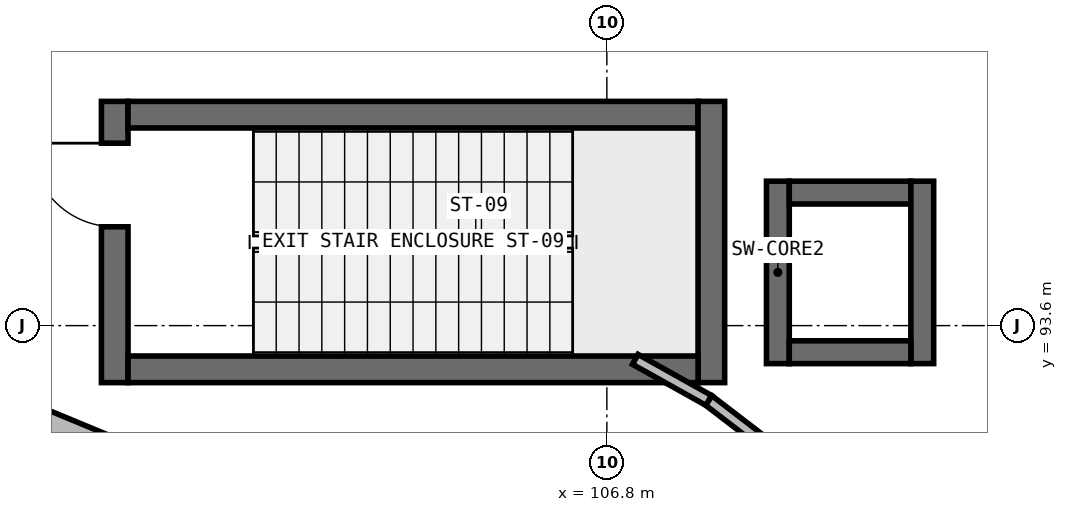
"""IFC4 building model, lengths in metres.
Left out: names, types, materials, properties, quantities, classifications, styles, units other than length and angle.
Written with IfcOpenShell. Run it as: python <this file> out.ifc"""

import sys

from ifc_helpers import new_model, si_unit, direction, frame, frame_2d, origin, place, context, subcontext, project, spatial, rectangle, extrude, element, fill, save


model = new_model("IFC4")
c1 = context("Model", 3, precision=1e-05, world=origin(), true_north=direction((0.0, 1.0)))
c2 = subcontext(c1, "Body", "Model", "MODEL_VIEW")
j1 = project(units=[si_unit("LENGTHUNIT", "METRE"), si_unit("PLANEANGLEUNIT", "RADIAN")], contexts=[c1])
p1 = place(None, origin())
s1 = spatial("IfcSite", under=j1, at=p1, CompositionType="ELEMENT")
p2 = place(p1, origin())
s2 = spatial("IfcBuilding", under=s1, at=p2, CompositionType="ELEMENT")
p3 = place(p2, origin())
s3 = spatial("IfcBuildingStorey", under=s2, at=p3, CompositionType="ELEMENT", Elevation=0.0)
p4 = place(p3, frame((100.325, 92.85, 0.0), z_axis=(0.0, 0.0, 1.0), x_axis=(0.0, 1.0, 0.0)))
e1 = element("IfcWall", 1, at=p4, inside=s3, PredefinedType="SHEAR", context=c2, shape_type="SweptSolid", body=[
    extrude(rectangle(XDim=3.7, YDim=0.35, at=frame_2d((1.85, 0.0))), origin(), (0.0, 0.0, 1.0), 5.25),
])
p5 = place(p4, frame((2.05, 0.0, 0.0)))
e2 = element("IfcOpeningElement", 2, at=p5, cuts=e1, PredefinedType="OPENING", context=c2, shape_type="SweptSolid", body=[
    extrude(rectangle(XDim=1.1, YDim=2.15, at=frame_2d((0.55, 1.075))), frame((0.0, 0.185, 0.0), z_axis=(0.0, -1.0, 0.0), x_axis=(1.0, 0.0, 0.0)), (0.0, 0.0, 1.0), 0.37),
])
p6 = place(p3, frame((100.5, 96.375, 0.0), z_axis=(0.0, 0.0, 1.0), x_axis=(1.0, 0.0, 0.0)))
e3 = element("IfcWall", 3, at=p6, inside=s3, PredefinedType="SHEAR", context=c2, shape_type="SweptSolid", body=[
    extrude(rectangle(XDim=7.5, YDim=0.35, at=frame_2d((3.75, 0.0))), origin(), (0.0, 0.0, 1.0), 5.25),
])
p7 = place(p3, frame((108.175, 96.55, 0.0), z_axis=(0.0, 0.0, 1.0), x_axis=(0.0, -1.0, 0.0)))
e4 = element("IfcWall", 4, at=p7, inside=s3, PredefinedType="SHEAR", context=c2, shape_type="SweptSolid", body=[
    extrude(rectangle(XDim=3.7, YDim=0.35, at=frame_2d((1.85, 0.0))), origin(), (0.0, 0.0, 1.0), 5.25),
])
p8 = place(p3, frame((108.0, 93.025, 0.0), z_axis=(0.0, 0.0, 1.0), x_axis=(-1.0, 0.0, 0.0)))
e5 = element("IfcWall", 5, at=p8, inside=s3, PredefinedType="SHEAR", context=c2, shape_type="SweptSolid", body=[
    extrude(rectangle(XDim=7.5, YDim=0.35, at=frame_2d((3.75, 0.0))), origin(), (0.0, 0.0, 1.0), 5.25),
])
p9 = place(p3, frame((109.05, 93.1, 0.0), z_axis=(0.0, 0.0, 1.0), x_axis=(0.0, 1.0, 0.0)))
e6 = element("IfcWall", 6, at=p9, inside=s3, PredefinedType="SHEAR", context=c2, shape_type="SweptSolid", body=[
    extrude(rectangle(XDim=2.4, YDim=0.3, at=frame_2d((1.2, 0.0))), origin(), (0.0, 0.0, 1.0), 5.07),
])
p10 = place(p3, frame((109.2, 95.35, 0.0), z_axis=(0.0, 0.0, 1.0), x_axis=(1.0, 0.0, 0.0)))
e7 = element("IfcWall", 7, at=p10, inside=s3, PredefinedType="SHEAR", context=c2, shape_type="SweptSolid", body=[
    extrude(rectangle(XDim=1.6, YDim=0.3, at=frame_2d((0.8, 0.0))), origin(), (0.0, 0.0, 1.0), 5.07),
])
p11 = place(p3, frame((110.95, 95.5, 0.0), z_axis=(0.0, 0.0, 1.0), x_axis=(0.0, -1.0, 0.0)))
e8 = element("IfcWall", 8, at=p11, inside=s3, PredefinedType="SHEAR", context=c2, shape_type="SweptSolid", body=[
    extrude(rectangle(XDim=2.4, YDim=0.3, at=frame_2d((1.2, 0.0))), origin(), (0.0, 0.0, 1.0), 5.07),
])
p12 = place(p3, frame((110.8, 93.25, 0.0), z_axis=(0.0, 0.0, 1.0), x_axis=(-1.0, 0.0, 0.0)))
e9 = element("IfcWall", 9, at=p12, inside=s3, PredefinedType="SHEAR", context=c2, shape_type="SweptSolid", body=[
    extrude(rectangle(XDim=1.6, YDim=0.3, at=frame_2d((0.8, 0.0))), origin(), (0.0, 0.0, 1.0), 5.07),
])
p13 = place(p3, frame((111.675, 98.726, 0.0), z_axis=(0.0, 0.0, 1.0), x_axis=(0.79334001117, -0.608778799465, 0.0)))
e10 = element("IfcWall", 10, at=p13, inside=s3, PredefinedType="SOLIDWALL", context=c2, shape_type="SweptSolid", body=[
    extrude(rectangle(XDim=12.868, YDim=0.34, at=frame_2d((6.434, 0.0))), origin(), (0.0, 0.0, 1.0), 4.516),
])
p14 = place(p13, frame((4.8, 0.0, 0.0)))
e11 = element("IfcOpeningElement", 11, at=p14, cuts=e10, PredefinedType="OPENING", context=c2, shape_type="SweptSolid", body=[
    extrude(rectangle(XDim=1.8, YDim=2.25, at=frame_2d((0.9, 1.125))), frame((0.0, 0.18, 0.0), z_axis=(0.0, -1.0, 0.0), x_axis=(1.0, 0.0, 0.0)), (0.0, 0.0, 1.0), 0.36),
])
p15 = place(p13, frame((2.472, 0.0, 0.95)))
e12 = element("IfcOpeningElement", 12, at=p15, cuts=e10, PredefinedType="OPENING", context=c2, shape_type="SweptSolid", body=[
    extrude(rectangle(XDim=1.49, YDim=1.73, at=frame_2d((0.745, 0.865))), frame((0.0, 0.18, 0.0), z_axis=(0.0, -1.0, 0.0), x_axis=(1.0, 0.0, 0.0)), (0.0, 0.0, 1.0), 0.36),
])
p16 = place(p13, frame((8.906, 0.0, 0.95)))
e13 = element("IfcOpeningElement", 13, at=p16, cuts=e10, PredefinedType="OPENING", context=c2, shape_type="SweptSolid", body=[
    extrude(rectangle(XDim=1.49, YDim=1.73, at=frame_2d((0.745, 0.865))), frame((0.0, 0.18, 0.0), z_axis=(0.0, -1.0, 0.0), x_axis=(1.0, 0.0, 0.0)), (0.0, 0.0, 1.0), 0.36),
])
p17 = place(p3, frame((106.325, 89.483, 0.0), z_axis=(0.0, 0.0, 1.0), x_axis=(-0.92385889973, 0.382733240508, 0.0)))
e14 = element("IfcWall", 14, at=p17, inside=s3, PredefinedType="SOLIDWALL", context=c2, shape_type="SweptSolid", body=[
    extrude(rectangle(XDim=10.081, YDim=0.29, at=frame_2d((5.04, 0.0))), origin(), (0.0, 0.0, 1.0), 5.07),
])
p18 = place(p17, frame((4.515, 0.0, 0.95)))
e15 = element("IfcOpeningElement", 15, at=p18, cuts=e14, PredefinedType="OPENING", context=c2, shape_type="SweptSolid", body=[
    extrude(rectangle(XDim=1.05, YDim=1.59, at=frame_2d((0.525, 0.795))), frame((0.0, 0.155, 0.0), z_axis=(0.0, -1.0, 0.0), x_axis=(1.0, 0.0, 0.0)), (0.0, 0.0, 1.0), 0.31),
])
p19 = place(p3, frame((96.748, 92.366, 0.0), z_axis=(0.0, 0.0, 1.0), x_axis=(0.923848052238, -0.382759423628, 0.0)))
e16 = element("IfcWall", 16, at=p19, inside=s3, PredefinedType="SOLIDWALL", context=c2, shape_type="SweptSolid", body=[
    extrude(rectangle(XDim=9.821, YDim=0.29, at=frame_2d((4.91, 0.0))), origin(), (0.0, 0.0, 1.0), 5.07),
])
p20 = place(p19, frame((1.765, 0.0, 0.95)))
e17 = element("IfcOpeningElement", 17, at=p20, cuts=e16, PredefinedType="OPENING", context=c2, shape_type="SweptSolid", body=[
    extrude(rectangle(XDim=1.38, YDim=1.56, at=frame_2d((0.69, 0.78))), frame((0.0, 0.155, 0.0), z_axis=(0.0, -1.0, 0.0), x_axis=(1.0, 0.0, 0.0)), (0.0, 0.0, 1.0), 0.31),
])
p21 = place(p19, frame((6.676, 0.0, 0.95)))
e18 = element("IfcOpeningElement", 18, at=p21, cuts=e16, PredefinedType="OPENING", context=c2, shape_type="SweptSolid", body=[
    extrude(rectangle(XDim=1.38, YDim=1.56, at=frame_2d((0.69, 0.78))), frame((0.0, 0.155, 0.0), z_axis=(0.0, -1.0, 0.0), x_axis=(1.0, 0.0, 0.0)), (0.0, 0.0, 1.0), 0.31),
])
p22 = place(p3, frame((116.896, 85.896, 0.0), z_axis=(0.0, 0.0, 1.0), x_axis=(-0.793301872689, 0.608828497024, 0.0)))
e19 = element("IfcWall", 19, at=p22, inside=s3, PredefinedType="PARTITIONING", context=c2, shape_type="SweptSolid", body=[
    extrude(rectangle(XDim=11.038, YDim=0.15, at=frame_2d((5.519, 0.0))), origin(), (0.0, 0.0, 1.0), 4.438),
])
p23 = place(p22, frame((4.95, 0.0, 0.0)))
e20 = element("IfcOpeningElement", 20, at=p23, cuts=e19, PredefinedType="OPENING", context=c2, shape_type="SweptSolid", body=[
    extrude(rectangle(XDim=1.1, YDim=2.2, at=frame_2d((0.55, 1.1))), frame((0.0, 0.085, 0.0), z_axis=(0.0, -1.0, 0.0), x_axis=(1.0, 0.0, 0.0)), (0.0, 0.0, 1.0), 0.17),
])
p24 = place(p3, frame((108.14, 92.616, 0.0), z_axis=(0.0, 0.0, 1.0), x_axis=(-0.872821867213, 0.488038920697, 0.0)))
e21 = element("IfcWall", 21, at=p24, inside=s3, PredefinedType="PARTITIONING", context=c2, shape_type="SweptSolid", body=[
    extrude(rectangle(XDim=1.106, YDim=0.15, at=frame_2d((0.553, 0.0))), origin(), (0.0, 0.0, 1.0), 4.93),
])
p25 = place(p3, frame((97.943, 96.839, 0.0), z_axis=(0.0, 0.0, 1.0), x_axis=(0.258832719409, 0.965922162166, 0.0)))
e22 = element("IfcWall", 22, at=p25, inside=s3, PredefinedType="PARTITIONING", context=c2, shape_type="SweptSolid", body=[
    extrude(rectangle(XDim=6.44, YDim=0.15, at=frame_2d((3.22, 0.0))), origin(), (0.0, 0.0, 1.0), 4.438),
])
p26 = place(p5, origin())
e23 = element("IfcDoor", 23, at=p26, inside=s3, OperationType="SINGLE_SWING_RIGHT", PredefinedType="DOOR", context=c2, shape_type="SweptSolid", body=[
    extrude(rectangle(XDim=1.1, YDim=2.15, at=frame_2d((0.55, 1.075))), frame((0.0, 0.025, 0.0), z_axis=(0.0, -1.0, 0.0), x_axis=(1.0, 0.0, 0.0)), (0.0, 0.0, 1.0), 0.05),
])
fill(e2, e23)
save(model, sys.argv[1])
